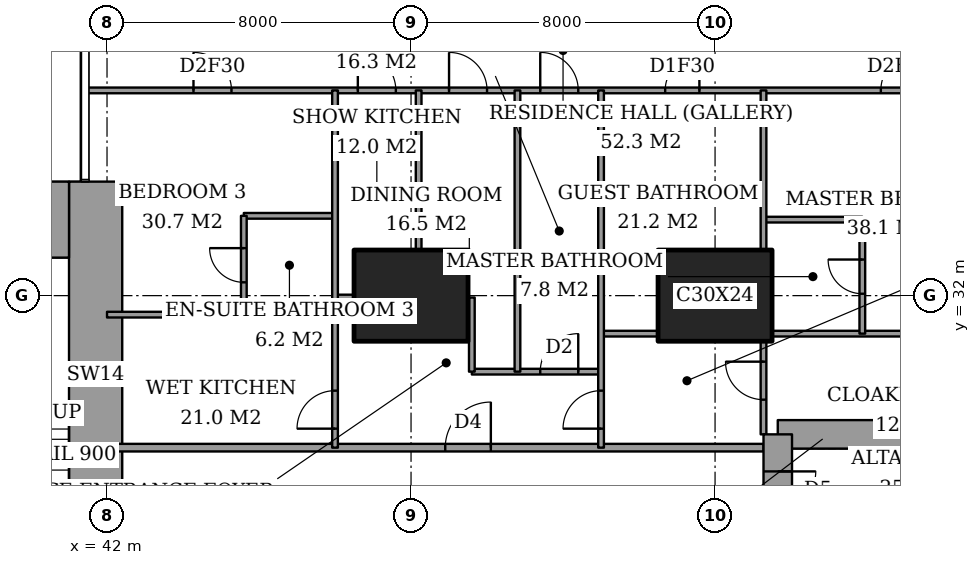
"""IFC4 building model, lengths in metres.
Left out: names, types, materials, properties, quantities, classifications, styles, units other than length and angle.
Written with IfcOpenShell. Run it as: python <this file> out.ifc"""

import sys

from ifc_helpers import new_model, si_unit, direction, frame, frame_2d, origin, origin_2d, place, context, subcontext, project, spatial, rectangle, extrude, element, fill, save


model = new_model("IFC4")
c1 = context("Model", 3, precision=1e-05, world=origin(), true_north=direction((0.0, 1.0)))
c2 = subcontext(c1, "Body", "Model", "MODEL_VIEW")
j1 = project(units=[si_unit("LENGTHUNIT", "METRE"), si_unit("PLANEANGLEUNIT", "RADIAN")], contexts=[c1])
p1 = place(None, origin())
s1 = spatial("IfcSite", under=j1, at=p1, CompositionType="ELEMENT")
p2 = place(p1, origin())
s2 = spatial("IfcBuilding", under=s1, at=p2, CompositionType="ELEMENT")
p3 = place(p2, frame((0.0, 0.0, 33.2)))
s3 = spatial("IfcBuildingStorey", under=s2, at=p3, CompositionType="ELEMENT", Elevation=33.2)
for number, where, z_axis, x_axis in (
    (1, (50.0, 32.0, 0.0), (0.0, 0.0, 1.0), (1.0, 0.0, 0.0)),
    (2, (58.0, 32.0, 0.0), (0.0, 0.0, 1.0), (1.0, 0.0, 0.0)),
):
    element("IfcColumn", number, at=place(p3, frame(where, z_axis=z_axis, x_axis=x_axis)), inside=s3, PredefinedType="COLUMN", context=c2, shape_type="SweptSolid", body=[
        extrude(rectangle(XDim=3.0, YDim=2.4, at=origin_2d()), origin(), (0.0, 0.0, 1.0), 3.6),
    ])
p4 = place(p3, frame((37.85, 34.0, 0.0), z_axis=(0.0, 0.0, 1.0), x_axis=(1.0, 0.0, 0.0)))
e3 = element("IfcWall", 3, at=p4, inside=s3, PredefinedType="SHEAR", context=c2, shape_type="SweptSolid", body=[
    extrude(rectangle(XDim=3.15, YDim=2.0, at=frame_2d((1.575, 0.0))), origin(), (0.0, 0.0, 1.0), 3.6),
])
p5 = place(p3, frame((41.7, 24.85, 0.0), z_axis=(0.0, 0.0, 1.0), x_axis=(0.0, 1.0, 0.0)))
e4 = element("IfcWall", 4, at=p5, inside=s3, PredefinedType="SHEAR", context=c2, shape_type="SweptSolid", body=[
    extrude(rectangle(XDim=10.15, YDim=1.4, at=frame_2d((5.075, 0.0))), origin(), (0.0, 0.0, 1.0), 3.6),
])
p6 = place(p3, frame((64.1, 28.35, 0.0), z_axis=(0.0, 0.0, 1.0), x_axis=(-1.0, 0.0, 0.0)))
e5 = element("IfcWall", 5, at=p6, inside=s3, PredefinedType="SHEAR", context=c2, shape_type="SweptSolid", body=[
    extrude(rectangle(XDim=4.45, YDim=0.75, at=frame_2d((2.225, 0.0))), origin(), (0.0, 0.0, 1.0), 3.6),
])
p7 = place(p3, frame((59.65, 28.35, 0.0), z_axis=(0.0, 0.0, 1.0), x_axis=(0.0, -1.0, 0.0)))
e6 = element("IfcWall", 6, at=p7, inside=s3, PredefinedType="SHEAR", context=c2, shape_type="SweptSolid", body=[
    extrude(rectangle(XDim=8.7, YDim=0.75, at=frame_2d((4.35, 0.0))), origin(), (0.0, 0.0, 1.0), 3.6),
])
p8 = place(p7, frame((0.975, 0.0, 0.0)))
e7 = element("IfcOpeningElement", 7, at=p8, cuts=e6, PredefinedType="OPENING", context=c2, shape_type="SweptSolid", body=[
    extrude(rectangle(XDim=1.0, YDim=2.1, at=frame_2d((0.5, 1.05))), frame((0.0, 0.385, 0.0), z_axis=(0.0, -1.0, 0.0), x_axis=(1.0, 0.0, 0.0)), (0.0, 0.0, 1.0), 0.77),
])
p9 = place(p3, frame((42.0, 28.0, 0.0), z_axis=(0.0, 0.0, 1.0), x_axis=(1.0, 0.0, 0.0)))
e8 = element("IfcWall", 8, at=p9, inside=s3, PredefinedType="PARTITIONING", context=c2, shape_type="SweptSolid", body=[
    extrude(rectangle(XDim=17.275, YDim=0.2, at=frame_2d((8.637, 0.0))), origin(), (0.0, 0.0, 1.0), 3.35),
])
p10 = place(p9, frame((8.9, 0.0, 0.0)))
e9 = element("IfcOpeningElement", 9, at=p10, cuts=e8, PredefinedType="OPENING", context=c2, shape_type="SweptSolid", body=[
    extrude(rectangle(XDim=1.2, YDim=2.4, at=frame_2d((0.6, 1.2))), frame((0.0, 0.11, 0.0), z_axis=(0.0, -1.0, 0.0), x_axis=(1.0, 0.0, 0.0)), (0.0, 0.0, 1.0), 0.22),
])
p11 = place(p3, frame((51.6, 30.0, 0.0), z_axis=(0.0, 0.0, 1.0), x_axis=(1.0, 0.0, 0.0)))
e10 = element("IfcWall", 10, at=p11, inside=s3, PredefinedType="PARTITIONING", context=c2, shape_type="SweptSolid", body=[
    extrude(rectangle(XDim=3.4, YDim=0.15, at=frame_2d((1.7, 0.0))), origin(), (0.0, 0.0, 1.0), 3.35),
])
p12 = place(p11, frame((1.8, 0.0, 0.0)))
e11 = element("IfcOpeningElement", 11, at=p12, cuts=e10, PredefinedType="OPENING", context=c2, shape_type="SweptSolid", body=[
    extrude(rectangle(XDim=1.0, YDim=2.1, at=frame_2d((0.5, 1.05))), frame((0.0, 0.085, 0.0), z_axis=(0.0, -1.0, 0.0), x_axis=(1.0, 0.0, 0.0)), (0.0, 0.0, 1.0), 0.17),
])
p13 = place(p3, frame((55.0, 31.0, 0.0), z_axis=(0.0, 0.0, 1.0), x_axis=(1.0, 0.0, 0.0)))
e12 = element("IfcWall", 12, at=p13, inside=s3, PredefinedType="PARTITIONING", context=c2, shape_type="SweptSolid", body=[
    extrude(rectangle(XDim=1.5, YDim=0.15, at=frame_2d((0.75, 0.0))), origin(), (0.0, 0.0, 1.0), 3.35),
])
p14 = place(p3, frame((59.5, 31.0, 0.0), z_axis=(0.0, 0.0, 1.0), x_axis=(1.0, 0.0, 0.0)))
e13 = element("IfcWall", 13, at=p14, inside=s3, PredefinedType="PARTITIONING", context=c2, shape_type="SweptSolid", body=[
    extrude(rectangle(XDim=5.15, YDim=0.15, at=frame_2d((2.575, 0.0))), origin(), (0.0, 0.0, 1.0), 3.35),
])
p15 = place(p3, frame((42.0, 31.5, 0.0), z_axis=(0.0, 0.0, 1.0), x_axis=(1.0, 0.0, 0.0)))
e14 = element("IfcWall", 14, at=p15, inside=s3, PredefinedType="PARTITIONING", context=c2, shape_type="SweptSolid", body=[
    extrude(rectangle(XDim=6.0, YDim=0.15, at=frame_2d((3.0, 0.0))), origin(), (0.0, 0.0, 1.0), 3.35),
])
p16 = place(p3, frame((48.0, 31.95, 0.0), z_axis=(0.0, 0.0, 1.0), x_axis=(1.0, 0.0, 0.0)))
e15 = element("IfcWall", 15, at=p16, inside=s3, PredefinedType="PARTITIONING", context=c2, shape_type="SweptSolid", body=[
    extrude(rectangle(XDim=0.5, YDim=0.15, at=frame_2d((0.25, 0.0))), origin(), (0.0, 0.0, 1.0), 2.634),
])
p17 = place(p3, frame((59.275, 34.0, 0.0), z_axis=(0.0, 0.0, 1.0), x_axis=(1.0, 0.0, 0.0)))
e16 = element("IfcWall", 16, at=p17, inside=s3, PredefinedType="PARTITIONING", context=c2, shape_type="SweptSolid", body=[
    extrude(rectangle(XDim=2.6, YDim=0.15, at=frame_2d((1.3, 0.0))), origin(), (0.0, 0.0, 1.0), 3.35),
])
p18 = place(p3, frame((45.6, 34.1, 0.0), z_axis=(0.0, 0.0, 1.0), x_axis=(1.0, 0.0, 0.0)))
e17 = element("IfcWall", 17, at=p18, inside=s3, PredefinedType="PARTITIONING", context=c2, shape_type="SweptSolid", body=[
    extrude(rectangle(XDim=2.4, YDim=0.15, at=frame_2d((1.2, 0.0))), origin(), (0.0, 0.0, 1.0), 3.35),
])
p19 = place(p3, frame((41.439, 37.4, 0.0), z_axis=(0.0, 0.0, 1.0), x_axis=(1.0, 0.0, 0.0)))
e18 = element("IfcWall", 18, at=p19, inside=s3, PredefinedType="PARTITIONING", context=c2, shape_type="SweptSolid", body=[
    extrude(rectangle(XDim=25.011, YDim=0.15, at=frame_2d((12.505, 0.0))), origin(), (0.0, 0.0, 1.0), 3.35),
])
p20 = place(p19, frame((11.961, 0.0, 0.0)))
e19 = element("IfcOpeningElement", 19, at=p20, cuts=e18, PredefinedType="OPENING", context=c2, shape_type="SweptSolid", body=[
    extrude(rectangle(XDim=1.0, YDim=2.1, at=frame_2d((0.5, 1.05))), frame((0.0, 0.085, 0.0), z_axis=(0.0, -1.0, 0.0), x_axis=(1.0, 0.0, 0.0)), (0.0, 0.0, 1.0), 0.17),
])
p21 = place(p19, frame((20.924, 0.0, 0.0)))
e20 = element("IfcOpeningElement", 20, at=p21, cuts=e18, PredefinedType="OPENING", context=c2, shape_type="SweptSolid", body=[
    extrude(rectangle(XDim=1.0, YDim=2.1, at=frame_2d((0.5, 1.05))), frame((0.0, 0.085, 0.0), z_axis=(0.0, -1.0, 0.0), x_axis=(1.0, 0.0, 0.0)), (0.0, 0.0, 1.0), 0.17),
])
p22 = place(p19, frame((15.249, 0.0, 0.0)))
e21 = element("IfcOpeningElement", 21, at=p22, cuts=e18, PredefinedType="OPENING", context=c2, shape_type="SweptSolid", body=[
    extrude(rectangle(XDim=0.9, YDim=2.1, at=frame_2d((0.45, 1.05))), frame((0.0, 0.085, 0.0), z_axis=(0.0, -1.0, 0.0), x_axis=(1.0, 0.0, 0.0)), (0.0, 0.0, 1.0), 0.17),
])
p23 = place(p19, frame((9.561, 0.0, 0.0)))
e22 = element("IfcOpeningElement", 22, at=p23, cuts=e18, PredefinedType="OPENING", context=c2, shape_type="SweptSolid", body=[
    extrude(rectangle(XDim=1.0, YDim=2.1, at=frame_2d((0.5, 1.05))), frame((0.0, 0.085, 0.0), z_axis=(0.0, -1.0, 0.0), x_axis=(1.0, 0.0, 0.0)), (0.0, 0.0, 1.0), 0.17),
])
p24 = place(p19, frame((7.161, 0.0, 0.0)))
e23 = element("IfcOpeningElement", 23, at=p24, cuts=e18, PredefinedType="OPENING", context=c2, shape_type="SweptSolid", body=[
    extrude(rectangle(XDim=1.0, YDim=2.1, at=frame_2d((0.5, 1.05))), frame((0.0, 0.085, 0.0), z_axis=(0.0, -1.0, 0.0), x_axis=(1.0, 0.0, 0.0)), (0.0, 0.0, 1.0), 0.17),
])
p25 = place(p19, frame((2.836, 0.0, 0.0)))
e24 = element("IfcOpeningElement", 24, at=p25, cuts=e18, PredefinedType="OPENING", context=c2, shape_type="SweptSolid", body=[
    extrude(rectangle(XDim=1.0, YDim=2.1, at=frame_2d((0.5, 1.05))), frame((0.0, 0.085, 0.0), z_axis=(0.0, -1.0, 0.0), x_axis=(1.0, 0.0, 0.0)), (0.0, 0.0, 1.0), 0.17),
])
p26 = place(p3, frame((45.6, 31.5, 0.0), z_axis=(0.0, 0.0, 1.0), x_axis=(0.0, 1.0, 0.0)))
e25 = element("IfcWall", 25, at=p26, inside=s3, PredefinedType="PARTITIONING", context=c2, shape_type="SweptSolid", body=[
    extrude(rectangle(XDim=2.6, YDim=0.15, at=frame_2d((1.3, 0.0))), origin(), (0.0, 0.0, 1.0), 3.35),
])
p27 = place(p26, frame((0.85, 0.0, 0.0)))
e26 = element("IfcOpeningElement", 26, at=p27, cuts=e25, PredefinedType="OPENING", context=c2, shape_type="SweptSolid", body=[
    extrude(rectangle(XDim=0.9, YDim=2.1, at=frame_2d((0.45, 1.05))), frame((0.0, 0.085, 0.0), z_axis=(0.0, -1.0, 0.0), x_axis=(1.0, 0.0, 0.0)), (0.0, 0.0, 1.0), 0.17),
])
p28 = place(p3, frame((48.0, 28.0, 0.0), z_axis=(0.0, 0.0, 1.0), x_axis=(0.0, 1.0, 0.0)))
e27 = element("IfcWall", 27, at=p28, inside=s3, PredefinedType="PARTITIONING", context=c2, shape_type="SweptSolid", body=[
    extrude(rectangle(XDim=9.4, YDim=0.15, at=frame_2d((4.7, 0.0))), origin(), (0.0, 0.0, 1.0), 3.35),
])
p29 = place(p28, frame((0.5, 0.0, 0.0)))
e28 = element("IfcOpeningElement", 28, at=p29, cuts=e27, PredefinedType="OPENING", context=c2, shape_type="SweptSolid", body=[
    extrude(rectangle(XDim=1.0, YDim=2.1, at=frame_2d((0.5, 1.05))), frame((0.0, 0.085, 0.0), z_axis=(0.0, -1.0, 0.0), x_axis=(1.0, 0.0, 0.0)), (0.0, 0.0, 1.0), 0.17),
])
p30 = place(p3, frame((50.2, 33.2, 0.0), z_axis=(0.0, 0.0, 1.0), x_axis=(0.0, 1.0, 0.0)))
e29 = element("IfcWall", 29, at=p30, inside=s3, PredefinedType="PARTITIONING", context=c2, shape_type="SweptSolid", body=[
    extrude(rectangle(XDim=4.2, YDim=0.15, at=frame_2d((2.1, 0.0))), origin(), (0.0, 0.0, 1.0), 3.35),
])
p31 = place(p3, frame((51.6, 30.0, 0.0), z_axis=(0.0, 0.0, 1.0), x_axis=(0.0, 1.0, 0.0)))
e30 = element("IfcWall", 30, at=p31, inside=s3, PredefinedType="PARTITIONING", context=c2, shape_type="SweptSolid", body=[
    extrude(rectangle(XDim=1.95, YDim=0.15, at=frame_2d((0.975, 0.0))), origin(), (0.0, 0.0, 1.0), 3.35),
])
p32 = place(p3, frame((52.8, 30.0, 0.0), z_axis=(0.0, 0.0, 1.0), x_axis=(0.0, 1.0, 0.0)))
e31 = element("IfcWall", 31, at=p32, inside=s3, PredefinedType="PARTITIONING", context=c2, shape_type="SweptSolid", body=[
    extrude(rectangle(XDim=7.4, YDim=0.15, at=frame_2d((3.7, 0.0))), origin(), (0.0, 0.0, 1.0), 3.35),
])
p33 = place(p3, frame((55.0, 28.0, 0.0), z_axis=(0.0, 0.0, 1.0), x_axis=(0.0, 1.0, 0.0)))
e32 = element("IfcWall", 32, at=p33, inside=s3, PredefinedType="PARTITIONING", context=c2, shape_type="SweptSolid", body=[
    extrude(rectangle(XDim=9.4, YDim=0.15, at=frame_2d((4.7, 0.0))), origin(), (0.0, 0.0, 1.0), 3.35),
])
p34 = place(p33, frame((0.5, 0.0, 0.0)))
e33 = element("IfcOpeningElement", 33, at=p34, cuts=e32, PredefinedType="OPENING", context=c2, shape_type="SweptSolid", body=[
    extrude(rectangle(XDim=1.0, YDim=2.1, at=frame_2d((0.5, 1.05))), frame((0.0, 0.085, 0.0), z_axis=(0.0, -1.0, 0.0), x_axis=(1.0, 0.0, 0.0)), (0.0, 0.0, 1.0), 0.17),
])
p35 = place(p3, frame((59.275, 28.35, 0.0), z_axis=(0.0, 0.0, 1.0), x_axis=(0.0, 1.0, 0.0)))
e34 = element("IfcWall", 34, at=p35, inside=s3, PredefinedType="PARTITIONING", context=c2, shape_type="SweptSolid", body=[
    extrude(rectangle(XDim=2.45, YDim=0.15, at=frame_2d((1.225, 0.0))), origin(), (0.0, 0.0, 1.0), 3.35),
])
p36 = place(p35, frame((0.913, 0.0, 0.0)))
e35 = element("IfcOpeningElement", 35, at=p36, cuts=e34, PredefinedType="OPENING", context=c2, shape_type="SweptSolid", body=[
    extrude(rectangle(XDim=1.0, YDim=2.1, at=frame_2d((0.5, 1.05))), frame((0.0, 0.085, 0.0), z_axis=(0.0, -1.0, 0.0), x_axis=(1.0, 0.0, 0.0)), (0.0, 0.0, 1.0), 0.17),
])
p37 = place(p3, frame((59.275, 33.2, 0.0), z_axis=(0.0, 0.0, 1.0), x_axis=(0.0, 1.0, 0.0)))
e36 = element("IfcWall", 36, at=p37, inside=s3, PredefinedType="PARTITIONING", context=c2, shape_type="SweptSolid", body=[
    extrude(rectangle(XDim=4.2, YDim=0.15, at=frame_2d((2.1, 0.0))), origin(), (0.0, 0.0, 1.0), 3.35),
])
p38 = place(p3, frame((61.875, 31.0, 0.0), z_axis=(0.0, 0.0, 1.0), x_axis=(0.0, 1.0, 0.0)))
e37 = element("IfcWall", 37, at=p38, inside=s3, PredefinedType="PARTITIONING", context=c2, shape_type="SweptSolid", body=[
    extrude(rectangle(XDim=3.0, YDim=0.15, at=frame_2d((1.5, 0.0))), origin(), (0.0, 0.0, 1.0), 3.35),
])
p39 = place(p38, frame((1.05, 0.0, 0.0)))
e38 = element("IfcOpeningElement", 38, at=p39, cuts=e37, PredefinedType="OPENING", context=c2, shape_type="SweptSolid", body=[
    extrude(rectangle(XDim=0.9, YDim=2.1, at=frame_2d((0.45, 1.05))), frame((0.0, 0.085, 0.0), z_axis=(0.0, -1.0, 0.0), x_axis=(1.0, 0.0, 0.0)), (0.0, 0.0, 1.0), 0.17),
])
p40 = place(p20, origin())
e39 = element("IfcDoor", 39, at=p40, inside=s3, OperationType="SINGLE_SWING_RIGHT", PredefinedType="DOOR", context=c2, shape_type="SweptSolid", body=[
    extrude(rectangle(XDim=1.0, YDim=2.1, at=frame_2d((0.5, 1.05))), frame((0.0, 0.025, 0.0), z_axis=(0.0, -1.0, 0.0), x_axis=(1.0, 0.0, 0.0)), (0.0, 0.0, 1.0), 0.05),
])
fill(e19, e39)
p41 = place(p39, origin())
e40 = element("IfcDoor", 40, at=p41, inside=s3, OperationType="SINGLE_SWING_LEFT", PredefinedType="DOOR", context=c2, shape_type="SweptSolid", body=[
    extrude(rectangle(XDim=0.9, YDim=2.1, at=frame_2d((0.45, 1.05))), frame((0.0, 0.025, 0.0), z_axis=(0.0, -1.0, 0.0), x_axis=(1.0, 0.0, 0.0)), (0.0, 0.0, 1.0), 0.05),
])
fill(e38, e40)
p42 = place(p21, origin())
e41 = element("IfcDoor", 41, at=p42, inside=s3, OperationType="SINGLE_SWING_LEFT", PredefinedType="DOOR", context=c2, shape_type="SweptSolid", body=[
    extrude(rectangle(XDim=1.0, YDim=2.1, at=frame_2d((0.5, 1.05))), frame((0.0, 0.025, 0.0), z_axis=(0.0, -1.0, 0.0), x_axis=(1.0, 0.0, 0.0)), (0.0, 0.0, 1.0), 0.05),
])
fill(e20, e41)
p43 = place(p36, origin())
e42 = element("IfcDoor", 42, at=p43, inside=s3, OperationType="SINGLE_SWING_LEFT", PredefinedType="DOOR", context=c2, shape_type="SweptSolid", body=[
    extrude(rectangle(XDim=1.0, YDim=2.1, at=frame_2d((0.5, 1.05))), frame((0.0, 0.025, 0.0), z_axis=(0.0, -1.0, 0.0), x_axis=(1.0, 0.0, 0.0)), (0.0, 0.0, 1.0), 0.05),
])
fill(e35, e42)
p44 = place(p22, origin())
e43 = element("IfcDoor", 43, at=p44, inside=s3, OperationType="SINGLE_SWING_LEFT", PredefinedType="DOOR", context=c2, shape_type="SweptSolid", body=[
    extrude(rectangle(XDim=0.9, YDim=2.1, at=frame_2d((0.45, 1.05))), frame((0.0, 0.025, 0.0), z_axis=(0.0, -1.0, 0.0), x_axis=(1.0, 0.0, 0.0)), (0.0, 0.0, 1.0), 0.05),
])
fill(e21, e43)
p45 = place(p34, origin())
e44 = element("IfcDoor", 44, at=p45, inside=s3, OperationType="SINGLE_SWING_RIGHT", PredefinedType="DOOR", context=c2, shape_type="SweptSolid", body=[
    extrude(rectangle(XDim=1.0, YDim=2.1, at=frame_2d((0.5, 1.05))), frame((0.0, 0.025, 0.0), z_axis=(0.0, -1.0, 0.0), x_axis=(1.0, 0.0, 0.0)), (0.0, 0.0, 1.0), 0.05),
])
fill(e33, e44)
p46 = place(p10, origin())
e45 = element("IfcDoor", 45, at=p46, inside=s3, OperationType="SINGLE_SWING_LEFT", PredefinedType="DOOR", context=c2, shape_type="SweptSolid", body=[
    extrude(rectangle(XDim=1.2, YDim=2.4, at=frame_2d((0.6, 1.2))), frame((0.0, 0.025, 0.0), z_axis=(0.0, -1.0, 0.0), x_axis=(1.0, 0.0, 0.0)), (0.0, 0.0, 1.0), 0.05),
])
fill(e9, e45)
p47 = place(p12, origin())
e46 = element("IfcDoor", 46, at=p47, inside=s3, OperationType="SINGLE_SWING_LEFT", PredefinedType="DOOR", context=c2, shape_type="SweptSolid", body=[
    extrude(rectangle(XDim=1.0, YDim=2.1, at=frame_2d((0.5, 1.05))), frame((0.0, 0.025, 0.0), z_axis=(0.0, -1.0, 0.0), x_axis=(1.0, 0.0, 0.0)), (0.0, 0.0, 1.0), 0.05),
])
fill(e11, e46)
p48 = place(p23, origin())
e47 = element("IfcDoor", 47, at=p48, inside=s3, OperationType="SINGLE_SWING_RIGHT", PredefinedType="DOOR", context=c2, shape_type="SweptSolid", body=[
    extrude(rectangle(XDim=1.0, YDim=2.1, at=frame_2d((0.5, 1.05))), frame((0.0, 0.025, 0.0), z_axis=(0.0, -1.0, 0.0), x_axis=(1.0, 0.0, 0.0)), (0.0, 0.0, 1.0), 0.05),
])
fill(e22, e47)
p49 = place(p24, origin())
e48 = element("IfcDoor", 48, at=p49, inside=s3, OperationType="SINGLE_SWING_RIGHT", PredefinedType="DOOR", context=c2, shape_type="SweptSolid", body=[
    extrude(rectangle(XDim=1.0, YDim=2.1, at=frame_2d((0.5, 1.05))), frame((0.0, 0.025, 0.0), z_axis=(0.0, -1.0, 0.0), x_axis=(1.0, 0.0, 0.0)), (0.0, 0.0, 1.0), 0.05),
])
fill(e23, e48)
p50 = place(p27, origin())
e49 = element("IfcDoor", 49, at=p50, inside=s3, OperationType="SINGLE_SWING_LEFT", PredefinedType="DOOR", context=c2, shape_type="SweptSolid", body=[
    extrude(rectangle(XDim=0.9, YDim=2.1, at=frame_2d((0.45, 1.05))), frame((0.0, 0.025, 0.0), z_axis=(0.0, -1.0, 0.0), x_axis=(1.0, 0.0, 0.0)), (0.0, 0.0, 1.0), 0.05),
])
fill(e26, e49)
p51 = place(p25, origin())
e50 = element("IfcDoor", 50, at=p51, inside=s3, OperationType="SINGLE_SWING_RIGHT", PredefinedType="DOOR", context=c2, shape_type="SweptSolid", body=[
    extrude(rectangle(XDim=1.0, YDim=2.1, at=frame_2d((0.5, 1.05))), frame((0.0, 0.025, 0.0), z_axis=(0.0, -1.0, 0.0), x_axis=(1.0, 0.0, 0.0)), (0.0, 0.0, 1.0), 0.05),
])
fill(e24, e50)
p52 = place(p29, origin())
e51 = element("IfcDoor", 51, at=p52, inside=s3, OperationType="SINGLE_SWING_RIGHT", PredefinedType="DOOR", context=c2, shape_type="SweptSolid", body=[
    extrude(rectangle(XDim=1.0, YDim=2.1, at=frame_2d((0.5, 1.05))), frame((0.0, 0.025, 0.0), z_axis=(0.0, -1.0, 0.0), x_axis=(1.0, 0.0, 0.0)), (0.0, 0.0, 1.0), 0.05),
])
fill(e28, e51)
p53 = place(p8, origin())
e52 = element("IfcDoor", 52, at=p53, inside=s3, OperationType="SINGLE_SWING_RIGHT", PredefinedType="DOOR", context=c2, shape_type="SweptSolid", body=[
    extrude(rectangle(XDim=1.0, YDim=2.1, at=frame_2d((0.5, 1.05))), frame((0.0, 0.025, 0.0), z_axis=(0.0, -1.0, 0.0), x_axis=(1.0, 0.0, 0.0)), (0.0, 0.0, 1.0), 0.05),
])
fill(e7, e52)
save(model, sys.argv[1])
